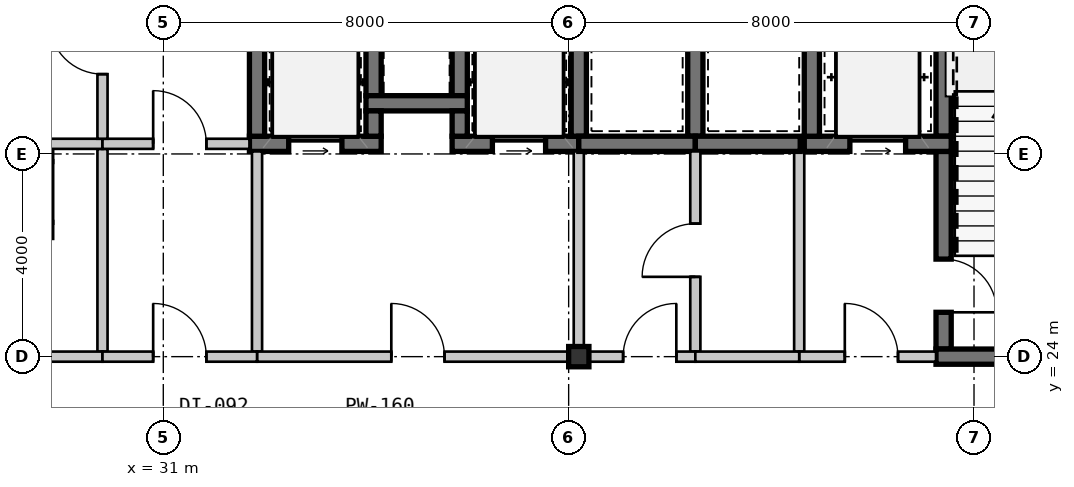
"""IFC4 building model, lengths in metres.
Left out: names, types, materials, properties, quantities, classifications, styles, units other than length and angle.
Written with IfcOpenShell. Run it as: python <this file> out.ifc"""

import sys

from ifc_helpers import new_model, si_unit, direction, frame, frame_2d, origin, origin_2d, place, context, subcontext, project, spatial, rectangle, hollow_rectangle, extrude, source, transform, mapped, element, fill, save


model = new_model("IFC4")
c1 = context("Model", 3, precision=1e-05, world=origin(), true_north=direction((0.0, 1.0)))
c2 = subcontext(c1, "Body", "Model", "MODEL_VIEW")
j1 = project(units=[si_unit("LENGTHUNIT", "METRE"), si_unit("PLANEANGLEUNIT", "RADIAN")], contexts=[c1])
p1 = place(None, origin())
s1 = spatial("IfcSite", under=j1, at=p1, CompositionType="ELEMENT")
p2 = place(p1, origin())
s2 = spatial("IfcBuilding", under=s1, at=p2, CompositionType="ELEMENT")
p3 = place(p2, frame((0.0, 0.0, 139.3)))
s3 = spatial("IfcBuildingStorey", under=s2, at=p3, CompositionType="ELEMENT", Elevation=139.3)
m1 = source(origin(), c2, "Body", "SweptSolid", [
    extrude(hollow_rectangle(XDim=0.4, YDim=0.4, WallThickness=0.016, at=origin_2d()), origin(), (0.0, 0.0, 1.0), 3.15),
])
p4 = place(p3, frame((39.2, 24.0, 0.0), z_axis=(0.0, 0.0, 1.0), x_axis=(1.0, 0.0, 0.0)))
e1 = element("IfcColumn", 1, at=p4, inside=s3, PredefinedType="COLUMN", context=c2, shape_type="MappedRepresentation", body=[
    mapped(m1, transform((0.0, 0.0, 0.0), scale=1.0)),
])
m2 = source(origin(), c2, "Body", "SweptSolid", [
    extrude(rectangle(XDim=3.5, YDim=0.3, at=frame_2d((1.75, 0.0))), origin(), (0.0, 0.0, 1.0), 2.93),
])
p5 = place(p3, frame((46.4, 31.85, 0.0), z_axis=(0.0, 0.0, 1.0), x_axis=(0.0, -1.0, 0.0)))
e2 = element("IfcWall", 2, at=p5, inside=s3, PredefinedType="SHEAR", context=c2, shape_type="MappedRepresentation", body=[
    mapped(m2, transform((0.0, 0.0, 0.0), scale=1.0)),
])
m3 = source(origin(), c2, "Body", "SweptSolid", [
    extrude(rectangle(XDim=3.9, YDim=0.3, at=frame_2d((1.95, 0.0))), origin(), (0.0, 0.0, 1.0), 2.93),
])
p6 = place(p3, frame((46.4, 28.05, 0.0), z_axis=(0.0, 0.0, 1.0), x_axis=(0.0, -1.0, 0.0)))
e3 = element("IfcWall", 3, at=p6, inside=s3, PredefinedType="SHEAR", context=c2, shape_type="MappedRepresentation", body=[
    mapped(m3, transform((0.0, 0.0, 0.0), scale=1.0)),
])
m4 = source(origin(), c2, "Body", "SweptSolid", [
    extrude(rectangle(XDim=1.05, YDim=2.1, at=frame_2d((0.525, 1.05))), frame((0.0, 0.16, 0.0), z_axis=(0.0, -1.0, 0.0), x_axis=(1.0, 0.0, 0.0)), (0.0, 0.0, 1.0), 0.32),
])
p7 = place(p6, frame((2.125, 0.0, 0.0)))
e4 = element("IfcOpeningElement", 4, at=p7, cuts=e3, PredefinedType="OPENING", context=c2, shape_type="MappedRepresentation", body=[
    mapped(m4, transform((0.0, 0.0, 0.0), scale=1.0)),
])
m5 = source(origin(), c2, "Body", "SweptSolid", [
    extrude(rectangle(XDim=4.9, YDim=0.3, at=frame_2d((2.45, 0.0))), origin(), (0.0, 0.0, 1.0), 2.93),
])
p8 = place(p3, frame((46.25, 24.0, 0.0), z_axis=(0.0, 0.0, 1.0), x_axis=(1.0, 0.0, 0.0)))
e5 = element("IfcWall", 5, at=p8, inside=s3, PredefinedType="SHEAR", context=c2, shape_type="MappedRepresentation", body=[
    mapped(m5, transform((0.0, 0.0, 0.0), scale=1.0)),
])
m6 = source(origin(), c2, "Body", "SweptSolid", [
    extrude(rectangle(XDim=2.9, YDim=0.3, at=frame_2d((1.45, 0.0))), origin(), (0.0, 0.0, 1.0), 2.93),
])
p9 = place(p3, frame((43.65, 28.2, 0.0), z_axis=(0.0, 0.0, 1.0), x_axis=(1.0, 0.0, 0.0)))
e6 = element("IfcWall", 6, at=p9, inside=s3, PredefinedType="SHEAR", context=c2, shape_type="MappedRepresentation", body=[
    mapped(m6, transform((0.0, 0.0, 0.0), scale=1.0)),
])
m7 = source(origin(), c2, "Body", "SweptSolid", [
    extrude(rectangle(XDim=1.1, YDim=2.15, at=frame_2d((0.55, 1.075))), frame((0.0, 0.16, 0.0), z_axis=(0.0, -1.0, 0.0), x_axis=(1.0, 0.0, 0.0)), (0.0, 0.0, 1.0), 0.32),
])
p10 = place(p9, frame((0.9, 0.0, 0.0)))
e7 = element("IfcOpeningElement", 7, at=p10, cuts=e6, PredefinedType="OPENING", context=c2, shape_type="MappedRepresentation", body=[
    mapped(m7, transform((0.0, 0.0, 0.0), scale=1.0)),
])
p11 = place(p3, frame((43.8, 31.85, 0.0), z_axis=(0.0, 0.0, 1.0), x_axis=(0.0, -1.0, 0.0)))
e8 = element("IfcWall", 8, at=p11, inside=s3, PredefinedType="SHEAR", context=c2, shape_type="MappedRepresentation", body=[
    mapped(m2, transform((0.0, 0.0, 0.0), scale=1.0)),
])
m8 = source(origin(), c2, "Body", "SweptSolid", [
    extrude(rectangle(XDim=3.95, YDim=0.2, at=frame_2d((1.975, 0.0))), origin(), (0.0, 0.0, 1.0), 2.93),
])
p12 = place(p3, frame((43.55, 28.05, 0.0), z_axis=(0.0, 0.0, 1.0), x_axis=(0.0, -1.0, 0.0)))
e9 = element("IfcWall", 9, at=p12, inside=s3, PredefinedType="SOLIDWALL", context=c2, shape_type="MappedRepresentation", body=[
    mapped(m8, transform((0.0, 0.0, 0.0), scale=1.0)),
])
m9 = source(origin(), c2, "Body", "SweptSolid", [
    extrude(rectangle(XDim=2.7, YDim=0.2, at=frame_2d((1.35, 0.0))), origin(), (0.0, 0.0, 1.0), 2.397),
])
p13 = place(p3, frame((43.55, 24.0, 0.0), z_axis=(0.0, 0.0, 1.0), x_axis=(1.0, 0.0, 0.0)))
e10 = element("IfcWall", 10, at=p13, inside=s3, PredefinedType="SOLIDWALL", context=c2, shape_type="MappedRepresentation", body=[
    mapped(m9, transform((0.0, 0.0, 0.0), scale=1.0)),
])
m10 = source(origin(), c2, "Body", "SweptSolid", [
    extrude(rectangle(XDim=1.05, YDim=2.1, at=frame_2d((0.525, 1.05))), frame((0.0, 0.11, 0.0), z_axis=(0.0, -1.0, 0.0), x_axis=(1.0, 0.0, 0.0)), (0.0, 0.0, 1.0), 0.22),
])
p14 = place(p13, frame((0.9, 0.0, 0.0)))
e11 = element("IfcOpeningElement", 11, at=p14, cuts=e10, PredefinedType="OPENING", context=c2, shape_type="MappedRepresentation", body=[
    mapped(m10, transform((0.0, 0.0, 0.0), scale=1.0)),
])
m11 = source(origin(), c2, "Body", "SweptSolid", [
    extrude(rectangle(XDim=1.2, YDim=0.3, at=frame_2d((0.6, 0.0))), origin(), (0.0, 0.0, 1.0), 2.93),
])
for number, where, z_axis, x_axis in (
    (12, (35.15, 30.35, 0.0), (0.0, 0.0, 1.0), (0.0, -1.0, 0.0)),
    (13, (36.85, 29.15, 0.0), (0.0, 0.0, 1.0), (0.0, 1.0, 0.0)),
):
    element("IfcWall", number, at=place(p3, frame(where, z_axis=z_axis, x_axis=x_axis)), inside=s3, PredefinedType="SHEAR", context=c2, shape_type="MappedRepresentation", body=[
        mapped(m11, transform((0.0, 0.0, 0.0), scale=1.0)),
    ])
m12 = source(origin(), c2, "Body", "SweptSolid", [
    extrude(rectangle(XDim=2.0, YDim=0.3, at=frame_2d((1.0, 0.0))), origin(), (0.0, 0.0, 1.0), 2.93),
])
p15 = place(p3, frame((35.0, 29.0, 0.0), z_axis=(0.0, 0.0, 1.0), x_axis=(1.0, 0.0, 0.0)))
e14 = element("IfcWall", 14, at=p15, inside=s3, PredefinedType="SHEAR", context=c2, shape_type="MappedRepresentation", body=[
    mapped(m12, transform((0.0, 0.0, 0.0), scale=1.0)),
])
m13 = source(origin(), c2, "Body", "SweptSolid", [
    extrude(rectangle(XDim=1.7, YDim=0.3, at=frame_2d((0.85, 0.0))), origin(), (0.0, 0.0, 1.0), 2.93),
])
p16 = place(p3, frame((27.1, 26.5, 0.0), z_axis=(0.0, 0.0, 1.0), x_axis=(1.0, 0.0, 0.0)))
e15 = element("IfcWall", 15, at=p16, inside=s3, PredefinedType="SHEAR", context=c2, shape_type="MappedRepresentation", body=[
    mapped(m13, transform((0.0, 0.0, 0.0), scale=1.0)),
])
m14 = source(origin(), c2, "Body", "SweptSolid", [
    extrude(rectangle(XDim=2.6, YDim=0.3, at=frame_2d((1.3, 0.0))), origin(), (0.0, 0.0, 1.0), 2.93),
])
p17 = place(p3, frame((32.7, 28.2, 0.0), z_axis=(0.0, 0.0, 1.0), x_axis=(1.0, 0.0, 0.0)))
e16 = element("IfcWall", 16, at=p17, inside=s3, PredefinedType="SHEAR", context=c2, shape_type="MappedRepresentation", body=[
    mapped(m14, transform((0.0, 0.0, 0.0), scale=1.0)),
])
m15 = source(origin(), c2, "Body", "SweptSolid", [
    extrude(rectangle(XDim=1.05, YDim=2.15, at=frame_2d((0.525, 1.075))), frame((0.0, 0.16, 0.0), z_axis=(0.0, -1.0, 0.0), x_axis=(1.0, 0.0, 0.0)), (0.0, 0.0, 1.0), 0.32),
])
p18 = place(p17, frame((0.775, 0.0, 0.0)))
e17 = element("IfcOpeningElement", 17, at=p18, cuts=e16, PredefinedType="OPENING", context=c2, shape_type="MappedRepresentation", body=[
    mapped(m15, transform((0.0, 0.0, 0.0), scale=1.0)),
])
m16 = source(origin(), c2, "Body", "SweptSolid", [
    extrude(rectangle(XDim=0.5, YDim=0.3, at=frame_2d((0.25, 0.0))), origin(), (0.0, 0.0, 1.0), 2.93),
])
p19 = place(p3, frame((35.15, 28.35, 0.0), z_axis=(0.0, 0.0, 1.0), x_axis=(0.0, 1.0, 0.0)))
e18 = element("IfcWall", 18, at=p19, inside=s3, PredefinedType="SHEAR", context=c2, shape_type="MappedRepresentation", body=[
    mapped(m16, transform((0.0, 0.0, 0.0), scale=1.0)),
])
p20 = place(p3, frame((32.85, 31.85, 0.0), z_axis=(0.0, 0.0, 1.0), x_axis=(0.0, -1.0, 0.0)))
e19 = element("IfcWall", 19, at=p20, inside=s3, PredefinedType="SHEAR", context=c2, shape_type="MappedRepresentation", body=[
    mapped(m2, transform((0.0, 0.0, 0.0), scale=1.0)),
])
m17 = source(origin(), c2, "Body", "SweptSolid", [
    extrude(rectangle(XDim=2.5, YDim=0.3, at=frame_2d((1.25, 0.0))), origin(), (0.0, 0.0, 1.0), 2.93),
])
p21 = place(p3, frame((36.7, 28.2, 0.0), z_axis=(0.0, 0.0, 1.0), x_axis=(1.0, 0.0, 0.0)))
e20 = element("IfcWall", 20, at=p21, inside=s3, PredefinedType="SHEAR", context=c2, shape_type="MappedRepresentation", body=[
    mapped(m17, transform((0.0, 0.0, 0.0), scale=1.0)),
])
p22 = place(p21, frame((0.795, 0.0, 0.0)))
e21 = element("IfcOpeningElement", 21, at=p22, cuts=e20, PredefinedType="OPENING", context=c2, shape_type="MappedRepresentation", body=[
    mapped(m15, transform((0.0, 0.0, 0.0), scale=1.0)),
])
p23 = place(p3, frame((36.85, 28.85, 0.0), z_axis=(0.0, 0.0, 1.0), x_axis=(0.0, -1.0, 0.0)))
e22 = element("IfcWall", 22, at=p23, inside=s3, PredefinedType="SHEAR", context=c2, shape_type="MappedRepresentation", body=[
    mapped(m16, transform((0.0, 0.0, 0.0), scale=1.0)),
])
p24 = place(p3, frame((39.2, 28.35, 0.0), z_axis=(0.0, 0.0, 1.0), x_axis=(0.0, 1.0, 0.0)))
e23 = element("IfcWall", 23, at=p24, inside=s3, PredefinedType="SHEAR", context=c2, shape_type="MappedRepresentation", body=[
    mapped(m2, transform((0.0, 0.0, 0.0), scale=1.0)),
])
p25 = place(p3, frame((32.85, 24.1, 0.0), z_axis=(0.0, 0.0, 1.0), x_axis=(0.0, 1.0, 0.0)))
e24 = element("IfcWall", 24, at=p25, inside=s3, PredefinedType="SOLIDWALL", context=c2, shape_type="MappedRepresentation", body=[
    mapped(m8, transform((0.0, 0.0, 0.0), scale=1.0)),
])
m18 = source(origin(), c2, "Body", "SweptSolid", [
    extrude(rectangle(XDim=3.95, YDim=0.2, at=frame_2d((1.975, 0.0))), origin(), (0.0, 0.0, 1.0), 2.47),
])
p26 = place(p3, frame((39.2, 28.05, 0.0), z_axis=(0.0, 0.0, 1.0), x_axis=(0.0, -1.0, 0.0)))
e25 = element("IfcWall", 25, at=p26, inside=s3, PredefinedType="SOLIDWALL", context=c2, shape_type="MappedRepresentation", body=[
    mapped(m18, transform((0.0, 0.0, 0.0), scale=1.0)),
])
m19 = source(origin(), c2, "Body", "SweptSolid", [
    extrude(rectangle(XDim=6.35, YDim=0.2, at=frame_2d((3.175, 0.0))), origin(), (0.0, 0.0, 1.0), 2.47),
])
p27 = place(p3, frame((39.2, 24.0, 0.0), z_axis=(0.0, 0.0, 1.0), x_axis=(-1.0, 0.0, 0.0)))
e26 = element("IfcWall", 26, at=p27, inside=s3, PredefinedType="SOLIDWALL", context=c2, shape_type="MappedRepresentation", body=[
    mapped(m19, transform((0.0, 0.0, 0.0), scale=1.0)),
])
p28 = place(p27, frame((2.65, 0.0, 0.0)))
e27 = element("IfcOpeningElement", 27, at=p28, cuts=e26, PredefinedType="OPENING", context=c2, shape_type="MappedRepresentation", body=[
    mapped(m10, transform((0.0, 0.0, 0.0), scale=1.0)),
])
p29 = place(p3, frame((41.5, 28.35, 0.0), z_axis=(0.0, 0.0, 1.0), x_axis=(0.0, 1.0, 0.0)))
e28 = element("IfcWall", 28, at=p29, inside=s3, PredefinedType="SHEAR", context=c2, shape_type="MappedRepresentation", body=[
    mapped(m2, transform((0.0, 0.0, 0.0), scale=1.0)),
])
m20 = source(origin(), c2, "Body", "SweptSolid", [
    extrude(rectangle(XDim=2.3, YDim=0.3, at=frame_2d((1.15, 0.0))), origin(), (0.0, 0.0, 1.0), 2.93),
])
p30 = place(p3, frame((39.2, 28.2, 0.0), z_axis=(0.0, 0.0, 1.0), x_axis=(1.0, 0.0, 0.0)))
e29 = element("IfcWall", 29, at=p30, inside=s3, PredefinedType="SHEAR", context=c2, shape_type="MappedRepresentation", body=[
    mapped(m20, transform((0.0, 0.0, 0.0), scale=1.0)),
])
m21 = source(origin(), c2, "Body", "SweptSolid", [
    extrude(rectangle(XDim=2.07, YDim=0.3, at=frame_2d((1.035, 0.0))), origin(), (0.0, 0.0, 1.0), 2.93),
])
p31 = place(p3, frame((41.5, 28.2, 0.0), z_axis=(0.0, 0.0, 1.0), x_axis=(1.0, 0.0, 0.0)))
e30 = element("IfcWall", 30, at=p31, inside=s3, PredefinedType="SHEAR", context=c2, shape_type="MappedRepresentation", body=[
    mapped(m21, transform((0.0, 0.0, 0.0), scale=1.0)),
])
m22 = source(origin(), c2, "Body", "SweptSolid", [
    extrude(rectangle(XDim=4.0, YDim=0.2, at=frame_2d((2.0, 0.0))), origin(), (0.0, 0.0, 1.0), 2.93),
])
p32 = place(p3, frame((29.8, 28.1, 0.0), z_axis=(0.0, 0.0, 1.0), x_axis=(0.0, -1.0, 0.0)))
e31 = element("IfcWall", 31, at=p32, inside=s3, PredefinedType="SOLIDWALL", context=c2, shape_type="MappedRepresentation", body=[
    mapped(m22, transform((0.0, 0.0, 0.0), scale=1.0)),
])
m23 = source(origin(), c2, "Body", "SweptSolid", [
    extrude(rectangle(XDim=3.35, YDim=0.2, at=frame_2d((1.675, 0.0))), origin(), (0.0, 0.0, 1.0), 2.93),
])
p33 = place(p3, frame((26.45, 28.2, 0.0), z_axis=(0.0, 0.0, 1.0), x_axis=(1.0, 0.0, 0.0)))
e32 = element("IfcWall", 32, at=p33, inside=s3, PredefinedType="SOLIDWALL", context=c2, shape_type="MappedRepresentation", body=[
    mapped(m23, transform((0.0, 0.0, 0.0), scale=1.0)),
])
m24 = source(origin(), c2, "Body", "SweptSolid", [
    extrude(rectangle(XDim=3.35, YDim=0.2, at=frame_2d((1.675, 0.0))), origin(), (0.0, 0.0, 1.0), 2.47),
])
p34 = place(p3, frame((29.8, 24.0, 0.0), z_axis=(0.0, 0.0, 1.0), x_axis=(-1.0, 0.0, 0.0)))
e33 = element("IfcWall", 33, at=p34, inside=s3, PredefinedType="SOLIDWALL", context=c2, shape_type="MappedRepresentation", body=[
    mapped(m24, transform((0.0, 0.0, 0.0), scale=1.0)),
])
m25 = source(origin(), c2, "Body", "SweptSolid", [
    extrude(rectangle(XDim=2.9, YDim=0.2, at=frame_2d((1.45, 0.0))), origin(), (0.0, 0.0, 1.0), 2.93),
])
p35 = place(p3, frame((29.8, 28.2, 0.0), z_axis=(0.0, 0.0, 1.0), x_axis=(1.0, 0.0, 0.0)))
e34 = element("IfcWall", 34, at=p35, inside=s3, PredefinedType="SOLIDWALL", context=c2, shape_type="MappedRepresentation", body=[
    mapped(m25, transform((0.0, 0.0, 0.0), scale=1.0)),
])
p36 = place(p35, frame((1.0, 0.0, 0.0)))
e35 = element("IfcOpeningElement", 35, at=p36, cuts=e34, PredefinedType="OPENING", context=c2, shape_type="MappedRepresentation", body=[
    mapped(m10, transform((0.0, 0.0, 0.0), scale=1.0)),
])
m26 = source(origin(), c2, "Body", "SweptSolid", [
    extrude(rectangle(XDim=3.05, YDim=0.2, at=frame_2d((1.525, 0.0))), origin(), (0.0, 0.0, 1.0), 2.47),
])
p37 = place(p3, frame((32.85, 24.0, 0.0), z_axis=(0.0, 0.0, 1.0), x_axis=(-1.0, 0.0, 0.0)))
e36 = element("IfcWall", 36, at=p37, inside=s3, PredefinedType="SOLIDWALL", context=c2, shape_type="MappedRepresentation", body=[
    mapped(m26, transform((0.0, 0.0, 0.0), scale=1.0)),
])
p38 = place(p37, frame((1.0, 0.0, 0.0)))
e37 = element("IfcOpeningElement", 37, at=p38, cuts=e36, PredefinedType="OPENING", context=c2, shape_type="MappedRepresentation", body=[
    mapped(m10, transform((0.0, 0.0, 0.0), scale=1.0)),
])
m27 = source(origin(), c2, "Body", "SweptSolid", [
    extrude(rectangle(XDim=3.55, YDim=0.2, at=frame_2d((1.775, 0.0))), origin(), (0.0, 0.0, 1.0), 2.93),
])
p39 = place(p3, frame((29.8, 31.85, 0.0), z_axis=(0.0, 0.0, 1.0), x_axis=(0.0, -1.0, 0.0)))
e38 = element("IfcWall", 38, at=p39, inside=s3, PredefinedType="SOLIDWALL", context=c2, shape_type="MappedRepresentation", body=[
    mapped(m27, transform((0.0, 0.0, 0.0), scale=1.0)),
])
p40 = place(p39, frame((1.225, 0.0, 0.0)))
e39 = element("IfcOpeningElement", 39, at=p40, cuts=e38, PredefinedType="OPENING", context=c2, shape_type="MappedRepresentation", body=[
    mapped(m10, transform((0.0, 0.0, 0.0), scale=1.0)),
])
p41 = place(p3, frame((41.5, 28.05, 0.0), z_axis=(0.0, 0.0, 1.0), x_axis=(0.0, -1.0, 0.0)))
e40 = element("IfcWall", 40, at=p41, inside=s3, PredefinedType="SOLIDWALL", context=c2, shape_type="MappedRepresentation", body=[
    mapped(m8, transform((0.0, 0.0, 0.0), scale=1.0)),
])
p42 = place(p41, frame((1.425, 0.0, 0.0)))
e41 = element("IfcOpeningElement", 41, at=p42, cuts=e40, PredefinedType="OPENING", context=c2, shape_type="MappedRepresentation", body=[
    mapped(m10, transform((0.0, 0.0, 0.0), scale=1.0)),
])
m28 = source(origin(), c2, "Body", "SweptSolid", [
    extrude(rectangle(XDim=2.3, YDim=0.2, at=frame_2d((1.15, 0.0))), origin(), (0.0, 0.0, 1.0), 2.397),
])
p43 = place(p3, frame((41.5, 24.0, 0.0), z_axis=(0.0, 0.0, 1.0), x_axis=(-1.0, 0.0, 0.0)))
e42 = element("IfcWall", 42, at=p43, inside=s3, PredefinedType="SOLIDWALL", context=c2, shape_type="MappedRepresentation", body=[
    mapped(m28, transform((0.0, 0.0, 0.0), scale=1.0)),
])
p44 = place(p43, frame((0.375, 0.0, 0.0)))
e43 = element("IfcOpeningElement", 43, at=p44, cuts=e42, PredefinedType="OPENING", context=c2, shape_type="MappedRepresentation", body=[
    mapped(m10, transform((0.0, 0.0, 0.0), scale=1.0)),
])
m29 = source(origin(), c2, "Body", "SweptSolid", [
    extrude(rectangle(XDim=2.05, YDim=0.2, at=frame_2d((1.025, 0.0))), origin(), (0.0, 0.0, 1.0), 2.397),
])
p45 = place(p3, frame((43.55, 24.0, 0.0), z_axis=(0.0, 0.0, 1.0), x_axis=(-1.0, 0.0, 0.0)))
e44 = element("IfcWall", 44, at=p45, inside=s3, PredefinedType="SOLIDWALL", context=c2, shape_type="MappedRepresentation", body=[
    mapped(m29, transform((0.0, 0.0, 0.0), scale=1.0)),
])
m30 = source(origin(), c2, "Body", "SweptSolid", [
    extrude(rectangle(XDim=1.05, YDim=2.1, at=frame_2d((0.525, 1.05))), frame((0.0, 0.025, 0.0), z_axis=(0.0, -1.0, 0.0), x_axis=(1.0, 0.0, 0.0)), (0.0, 0.0, 1.0), 0.05),
])
p46 = place(p7, origin())
e45 = element("IfcDoor", 45, at=p46, inside=s3, OperationType="SINGLE_SWING_RIGHT", PredefinedType="DOOR", context=c2, shape_type="MappedRepresentation", body=[
    mapped(m30, transform((0.0, 0.0, 0.0), scale=1.0)),
])
fill(e4, e45)
m31 = source(origin(), c2, "Body", "SweptSolid", [
    extrude(rectangle(XDim=1.1, YDim=2.15, at=frame_2d((0.55, 1.075))), frame((0.0, 0.025, 0.0), z_axis=(0.0, -1.0, 0.0), x_axis=(1.0, 0.0, 0.0)), (0.0, 0.0, 1.0), 0.05),
])
p47 = place(p10, origin())
e46 = element("IfcDoor", 46, at=p47, inside=s3, OperationType="SLIDING_TO_LEFT", PredefinedType="DOOR", context=c2, shape_type="MappedRepresentation", body=[
    mapped(m31, transform((0.0, 0.0, 0.0), scale=1.0)),
])
fill(e7, e46)
p48 = place(p14, origin())
e47 = element("IfcDoor", 47, at=p48, inside=s3, OperationType="SINGLE_SWING_LEFT", PredefinedType="DOOR", context=c2, shape_type="MappedRepresentation", body=[
    mapped(m30, transform((0.0, 0.0, 0.0), scale=1.0)),
])
fill(e11, e47)
m32 = source(origin(), c2, "Body", "SweptSolid", [
    extrude(rectangle(XDim=1.05, YDim=2.15, at=frame_2d((0.525, 1.075))), frame((0.0, 0.025, 0.0), z_axis=(0.0, -1.0, 0.0), x_axis=(1.0, 0.0, 0.0)), (0.0, 0.0, 1.0), 0.05),
])
p49 = place(p18, origin())
e48 = element("IfcDoor", 48, at=p49, inside=s3, OperationType="SLIDING_TO_LEFT", PredefinedType="DOOR", context=c2, shape_type="MappedRepresentation", body=[
    mapped(m32, transform((0.0, 0.0, 0.0), scale=1.0)),
])
fill(e17, e48)
p50 = place(p22, origin())
e49 = element("IfcDoor", 49, at=p50, inside=s3, OperationType="SLIDING_TO_LEFT", PredefinedType="DOOR", context=c2, shape_type="MappedRepresentation", body=[
    mapped(m32, transform((0.0, 0.0, 0.0), scale=1.0)),
])
fill(e21, e49)
p51 = place(p28, frame((1.05, 0.0, 0.0), z_axis=(0.0, 0.0, 1.0), x_axis=(-1.0, 0.0, 0.0)))
e50 = element("IfcDoor", 50, at=p51, inside=s3, OperationType="SINGLE_SWING_LEFT", PredefinedType="DOOR", context=c2, shape_type="MappedRepresentation", body=[
    mapped(m30, transform((0.0, 0.0, 0.0), scale=1.0)),
])
fill(e27, e50)
p52 = place(p36, origin())
e51 = element("IfcDoor", 51, at=p52, inside=s3, OperationType="SINGLE_SWING_LEFT", PredefinedType="DOOR", context=c2, shape_type="MappedRepresentation", body=[
    mapped(m30, transform((0.0, 0.0, 0.0), scale=1.0)),
])
fill(e35, e51)
p53 = place(p38, frame((1.05, 0.0, 0.0), z_axis=(0.0, 0.0, 1.0), x_axis=(-1.0, 0.0, 0.0)))
e52 = element("IfcDoor", 52, at=p53, inside=s3, OperationType="SINGLE_SWING_LEFT", PredefinedType="DOOR", context=c2, shape_type="MappedRepresentation", body=[
    mapped(m30, transform((0.0, 0.0, 0.0), scale=1.0)),
])
fill(e37, e52)
p54 = place(p40, frame((1.05, 0.0, 0.0), z_axis=(0.0, 0.0, 1.0), x_axis=(-1.0, 0.0, 0.0)))
e53 = element("IfcDoor", 53, at=p54, inside=s3, OperationType="SINGLE_SWING_RIGHT", PredefinedType="DOOR", context=c2, shape_type="MappedRepresentation", body=[
    mapped(m30, transform((0.0, 0.0, 0.0), scale=1.0)),
])
fill(e39, e53)
p55 = place(p42, frame((1.05, 0.0, 0.0), z_axis=(0.0, 0.0, 1.0), x_axis=(-1.0, 0.0, 0.0)))
e54 = element("IfcDoor", 54, at=p55, inside=s3, OperationType="SINGLE_SWING_LEFT", PredefinedType="DOOR", context=c2, shape_type="MappedRepresentation", body=[
    mapped(m30, transform((0.0, 0.0, 0.0), scale=1.0)),
])
fill(e41, e54)
p56 = place(p44, frame((1.05, 0.0, 0.0), z_axis=(0.0, 0.0, 1.0), x_axis=(-1.0, 0.0, 0.0)))
e55 = element("IfcDoor", 55, at=p56, inside=s3, OperationType="SINGLE_SWING_RIGHT", PredefinedType="DOOR", context=c2, shape_type="MappedRepresentation", body=[
    mapped(m30, transform((0.0, 0.0, 0.0), scale=1.0)),
])
fill(e43, e55)
save(model, sys.argv[1])
